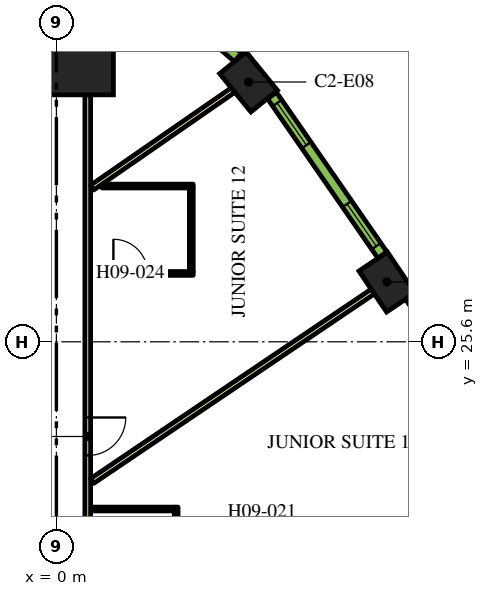
"""IFC4 building model, lengths in metres.
Left out: names, types, materials, properties, quantities, classifications, styles, units other than length and angle.
Written with IfcOpenShell. Run it as: python <this file> out.ifc"""

import sys

from ifc_helpers import new_model, si_unit, direction, frame, frame_2d, origin, origin_2d, place, context, subcontext, project, spatial, rectangle, extrude, element, fill, save


model = new_model("IFC4")
c1 = context("Model", 3, precision=1e-05, world=origin(), true_north=direction((0.0, 1.0)))
c2 = subcontext(c1, "Body", "Model", "MODEL_VIEW")
j1 = project(units=[si_unit("LENGTHUNIT", "METRE"), si_unit("PLANEANGLEUNIT", "RADIAN")], contexts=[c1])
p1 = place(None, origin())
s1 = spatial("IfcSite", under=j1, at=p1, CompositionType="ELEMENT")
p2 = place(p1, origin())
s2 = spatial("IfcBuilding", under=s1, at=p2, CompositionType="ELEMENT")
p3 = place(p2, frame((0.0, 0.0, 118.8)))
s3 = spatial("IfcBuildingStorey", under=s2, at=p3, CompositionType="ELEMENT", Elevation=118.8)
p4 = place(p3, frame((0.0, 33.598, 0.0), z_axis=(0.0, 0.0, 1.0), x_axis=(0.0, 1.0, 0.0)))
e1 = element("IfcColumn", 1, at=p4, inside=s3, PredefinedType="COLUMN", context=c2, shape_type="SweptSolid", body=[
    extrude(rectangle(XDim=3.0, YDim=3.0, at=origin_2d()), origin(), (0.0, 0.0, 1.0), 3.9),
])
for number, where, z_axis, x_axis in (
    (2, (8.699, 27.174, 0.0), (0.0, 0.0, 1.0), (-0.559, 0.829, 0.0)),
    (3, (5.056, 32.437, 0.0), (0.0, 0.0, 1.0), (-0.632, 0.775, 0.0)),
):
    element("IfcColumn", number, at=place(p3, frame(where, z_axis=z_axis, x_axis=x_axis)), inside=s3, PredefinedType="COLUMN", context=c2, shape_type="SweptSolid", body=[
        extrude(rectangle(XDim=1.3, YDim=0.9, at=origin_2d()), origin(), (0.0, 0.0, 1.0), 3.9),
    ])
p5 = place(p3, frame((0.825, 32.098, 0.0), z_axis=(0.0, 0.0, 1.0), x_axis=(0.0, -1.0, 0.0)))
e4 = element("IfcWall", 4, at=p5, inside=s3, PredefinedType="PARTITIONING", context=c2, shape_type="SweptSolid", body=[
    extrude(rectangle(XDim=13.543, YDim=0.15, at=frame_2d((6.772, 0.0))), origin(), (0.0, 0.0, 1.0), 2.75),
])
p6 = place(p5, frame((8.49, 0.0, 0.0)))
e5 = element("IfcOpeningElement", 5, at=p6, cuts=e4, PredefinedType="OPENING", context=c2, shape_type="SweptSolid", body=[
    extrude(rectangle(XDim=1.0, YDim=2.1, at=frame_2d((0.5, 1.05))), frame((0.0, 0.085, 0.0), z_axis=(0.0, -1.0, 0.0), x_axis=(1.0, 0.0, 0.0)), (0.0, 0.0, 1.0), 0.17),
])
p7 = place(p3, frame((8.326, 26.923, 0.0), z_axis=(0.0, 0.0, 1.0), x_axis=(-0.828836601893, -0.5594907393, 0.0)))
e6 = element("IfcWall", 6, at=p7, inside=s3, PredefinedType="PARTITIONING", context=c2, shape_type="SweptSolid", body=[
    extrude(rectangle(XDim=8.909, YDim=0.15, at=frame_2d((4.455, 0.0))), origin(), (0.0, 0.0, 1.0), 2.75),
])
p8 = place(p3, frame((4.649, 32.223, 0.0), z_axis=(0.0, 0.0, 1.0), x_axis=(-0.822262349475, -0.569108626394, 0.0)))
e7 = element("IfcWall", 7, at=p8, inside=s3, PredefinedType="PARTITIONING", context=c2, shape_type="SweptSolid", body=[
    extrude(rectangle(XDim=4.51, YDim=0.15, at=frame_2d((2.255, 0.0))), origin(), (0.0, 0.0, 1.0), 2.75),
])
p9 = place(p3, frame((11.838, 21.585, 0.0), z_axis=(0.0, 0.0, 1.0), x_axis=(-0.841699322813, -0.539946525108, 0.0)))
e8 = element("IfcWall", 8, at=p9, inside=s3, PredefinedType="PARTITIONING", context=c2, shape_type="SweptSolid", body=[
    extrude(rectangle(XDim=6.392, YDim=0.15, at=frame_2d((3.196, 0.0))), origin(), (0.0, 0.0, 1.0), 2.75),
])
p10 = place(p3, frame((3.151, 18.55, 0.0), z_axis=(0.0, 0.0, 1.0), x_axis=(0.0, 1.0, 0.0)))
e9 = element("IfcWall", 9, at=p10, inside=s3, PredefinedType="PARTITIONING", context=c2, shape_type="SweptSolid", body=[
    extrude(rectangle(XDim=2.7, YDim=0.1, at=frame_2d((1.35, 0.0))), origin(), (0.0, 0.0, 1.0), 2.75),
])
p11 = place(p10, frame((0.6, 0.0, 0.0)))
e10 = element("IfcOpeningElement", 10, at=p11, cuts=e9, PredefinedType="OPENING", context=c2, shape_type="SweptSolid", body=[
    extrude(rectangle(XDim=0.9, YDim=2.1, at=frame_2d((0.45, 1.05))), frame((0.0, 0.06, 0.0), z_axis=(0.0, -1.0, 0.0), x_axis=(1.0, 0.0, 0.0)), (0.0, 0.0, 1.0), 0.12),
])
p12 = place(p3, frame((3.101, 21.2, 0.0), z_axis=(0.0, 0.0, 1.0), x_axis=(-1.0, 0.0, 0.0)))
e11 = element("IfcWall", 11, at=p12, inside=s3, PredefinedType="PARTITIONING", context=c2, shape_type="SweptSolid", body=[
    extrude(rectangle(XDim=2.2, YDim=0.1, at=frame_2d((1.1, 0.0))), origin(), (0.0, 0.0, 1.0), 2.75),
])
p13 = place(p3, frame((0.9, 27.398, 0.0), z_axis=(0.0, 0.0, 1.0), x_axis=(1.0, 0.0, 0.0)))
e12 = element("IfcWall", 12, at=p13, inside=s3, PredefinedType="PARTITIONING", context=c2, shape_type="SweptSolid", body=[
    extrude(rectangle(XDim=2.7, YDim=0.1, at=frame_2d((1.35, 0.0))), origin(), (0.0, 0.0, 1.0), 2.75),
])
p14 = place(p13, frame((0.6, 0.0, 0.0)))
e13 = element("IfcOpeningElement", 13, at=p14, cuts=e12, PredefinedType="OPENING", context=c2, shape_type="SweptSolid", body=[
    extrude(rectangle(XDim=0.9, YDim=2.1, at=frame_2d((0.45, 1.05))), frame((0.0, 0.06, 0.0), z_axis=(0.0, -1.0, 0.0), x_axis=(1.0, 0.0, 0.0)), (0.0, 0.0, 1.0), 0.12),
])
p15 = place(p3, frame((3.55, 27.448, 0.0), z_axis=(0.0, 0.0, 1.0), x_axis=(0.0, 1.0, 0.0)))
e14 = element("IfcWall", 14, at=p15, inside=s3, PredefinedType="PARTITIONING", context=c2, shape_type="SweptSolid", body=[
    extrude(rectangle(XDim=2.2, YDim=0.1, at=frame_2d((1.1, 0.0))), origin(), (0.0, 0.0, 1.0), 2.75),
])
p16 = place(p3, frame((1.2, 29.698, 0.0), z_axis=(0.0, 0.0, 1.0), x_axis=(1.0, 0.0, 0.0)))
e15 = element("IfcWall", 15, at=p16, inside=s3, PredefinedType="PARTITIONING", context=c2, shape_type="SweptSolid", body=[
    extrude(rectangle(XDim=2.4, YDim=0.1, at=frame_2d((1.2, 0.0))), origin(), (0.0, 0.0, 1.0), 2.75),
])
p17 = place(p3, frame((12.115, 22.539, 0.0), z_axis=(0.0, 0.0, 1.0), x_axis=(-0.549741341923, 0.835334937005, 0.0)))
e16 = element("IfcWall", 16, at=p17, inside=s3, PredefinedType="SOLIDWALL", context=c2, shape_type="SweptSolid", body=[
    extrude(rectangle(XDim=5.1, YDim=0.29, at=frame_2d((2.55, 0.0))), origin(), (0.0, 0.0, 1.0), 3.65),
])
p18 = place(p17, frame((0.273, 0.0, 0.9)))
e17 = element("IfcOpeningElement", 17, at=p18, cuts=e16, PredefinedType="OPENING", context=c2, shape_type="SweptSolid", body=[
    extrude(rectangle(XDim=1.35, YDim=2.15, at=frame_2d((0.675, 1.075))), frame((0.0, 0.155, 0.0), z_axis=(0.0, -1.0, 0.0), x_axis=(1.0, 0.0, 0.0)), (0.0, 0.0, 1.0), 0.31),
])
p19 = place(p17, frame((3.478, 0.0, 0.9)))
e18 = element("IfcOpeningElement", 18, at=p19, cuts=e16, PredefinedType="OPENING", context=c2, shape_type="SweptSolid", body=[
    extrude(rectangle(XDim=1.35, YDim=2.15, at=frame_2d((0.675, 1.075))), frame((0.0, 0.155, 0.0), z_axis=(0.0, -1.0, 0.0), x_axis=(1.0, 0.0, 0.0)), (0.0, 0.0, 1.0), 0.31),
])
p20 = place(p3, frame((8.58, 27.882, 0.0), z_axis=(0.0, 0.0, 1.0), x_axis=(-0.569113019126, 0.822259309136, 0.0)))
e19 = element("IfcWall", 19, at=p20, inside=s3, PredefinedType="SOLIDWALL", context=c2, shape_type="SweptSolid", body=[
    extrude(rectangle(XDim=5.107, YDim=0.29, at=frame_2d((2.553, 0.0))), origin(), (0.0, 0.0, 1.0), 3.65),
])
p21 = place(p20, frame((0.285, 0.0, 0.9)))
e20 = element("IfcOpeningElement", 20, at=p21, cuts=e19, PredefinedType="OPENING", context=c2, shape_type="SweptSolid", body=[
    extrude(rectangle(XDim=1.35, YDim=2.15, at=frame_2d((0.675, 1.075))), frame((0.0, 0.155, 0.0), z_axis=(0.0, -1.0, 0.0), x_axis=(1.0, 0.0, 0.0)), (0.0, 0.0, 1.0), 0.31),
])
p22 = place(p20, frame((3.516, 0.0, 0.9)))
e21 = element("IfcOpeningElement", 21, at=p22, cuts=e19, PredefinedType="OPENING", context=c2, shape_type="SweptSolid", body=[
    extrude(rectangle(XDim=1.35, YDim=2.15, at=frame_2d((0.675, 1.075))), frame((0.0, 0.155, 0.0), z_axis=(0.0, -1.0, 0.0), x_axis=(1.0, 0.0, 0.0)), (0.0, 0.0, 1.0), 0.31),
])
p23 = place(p3, frame((4.778, 33.082, 0.0), z_axis=(0.0, 0.0, 1.0), x_axis=(-0.754882764627, 0.655859749999, 0.0)))
e22 = element("IfcWall", 22, at=p23, inside=s3, PredefinedType="SOLIDWALL", context=c2, shape_type="SweptSolid", body=[
    extrude(rectangle(XDim=1.82, YDim=0.29, at=frame_2d((0.91, 0.0))), origin(), (0.0, 0.0, 1.0), 3.65),
])
p24 = place(p23, frame((0.46, 0.0, 0.9)))
e23 = element("IfcOpeningElement", 23, at=p24, cuts=e22, PredefinedType="OPENING", context=c2, shape_type="SweptSolid", body=[
    extrude(rectangle(XDim=0.9, YDim=2.15, at=frame_2d((0.45, 1.075))), frame((0.0, 0.155, 0.0), z_axis=(0.0, -1.0, 0.0), x_axis=(1.0, 0.0, 0.0)), (0.0, 0.0, 1.0), 0.31),
])
p25 = place(p6, origin())
e24 = element("IfcDoor", 24, at=p25, inside=s3, OperationType="SINGLE_SWING_RIGHT", PredefinedType="DOOR", context=c2, shape_type="SweptSolid", body=[
    extrude(rectangle(XDim=1.0, YDim=2.1, at=frame_2d((0.5, 1.05))), frame((0.0, 0.025, 0.0), z_axis=(0.0, -1.0, 0.0), x_axis=(1.0, 0.0, 0.0)), (0.0, 0.0, 1.0), 0.05),
])
fill(e5, e24)
p26 = place(p14, origin())
e25 = element("IfcDoor", 25, at=p26, inside=s3, OperationType="SINGLE_SWING_RIGHT", PredefinedType="DOOR", context=c2, shape_type="SweptSolid", body=[
    extrude(rectangle(XDim=0.9, YDim=2.1, at=frame_2d((0.45, 1.05))), frame((0.0, 0.025, 0.0), z_axis=(0.0, -1.0, 0.0), x_axis=(1.0, 0.0, 0.0)), (0.0, 0.0, 1.0), 0.05),
])
fill(e13, e25)
p27 = place(p21, origin())
e26 = element("IfcWindow", 26, at=p27, inside=s3, PartitioningType="DOUBLE_PANEL_VERTICAL", PredefinedType="WINDOW", context=c2, shape_type="SweptSolid", body=[
    extrude(rectangle(XDim=1.35, YDim=2.15, at=frame_2d((0.675, 1.075))), frame((0.0, 0.015, 0.0), z_axis=(0.0, -1.0, 0.0), x_axis=(1.0, 0.0, 0.0)), (0.0, 0.0, 1.0), 0.06),
])
fill(e20, e26)
p28 = place(p22, origin())
e27 = element("IfcWindow", 27, at=p28, inside=s3, PartitioningType="DOUBLE_PANEL_VERTICAL", PredefinedType="WINDOW", context=c2, shape_type="SweptSolid", body=[
    extrude(rectangle(XDim=1.35, YDim=2.15, at=frame_2d((0.675, 1.075))), frame((0.0, 0.015, 0.0), z_axis=(0.0, -1.0, 0.0), x_axis=(1.0, 0.0, 0.0)), (0.0, 0.0, 1.0), 0.06),
])
fill(e21, e27)
save(model, sys.argv[1])
